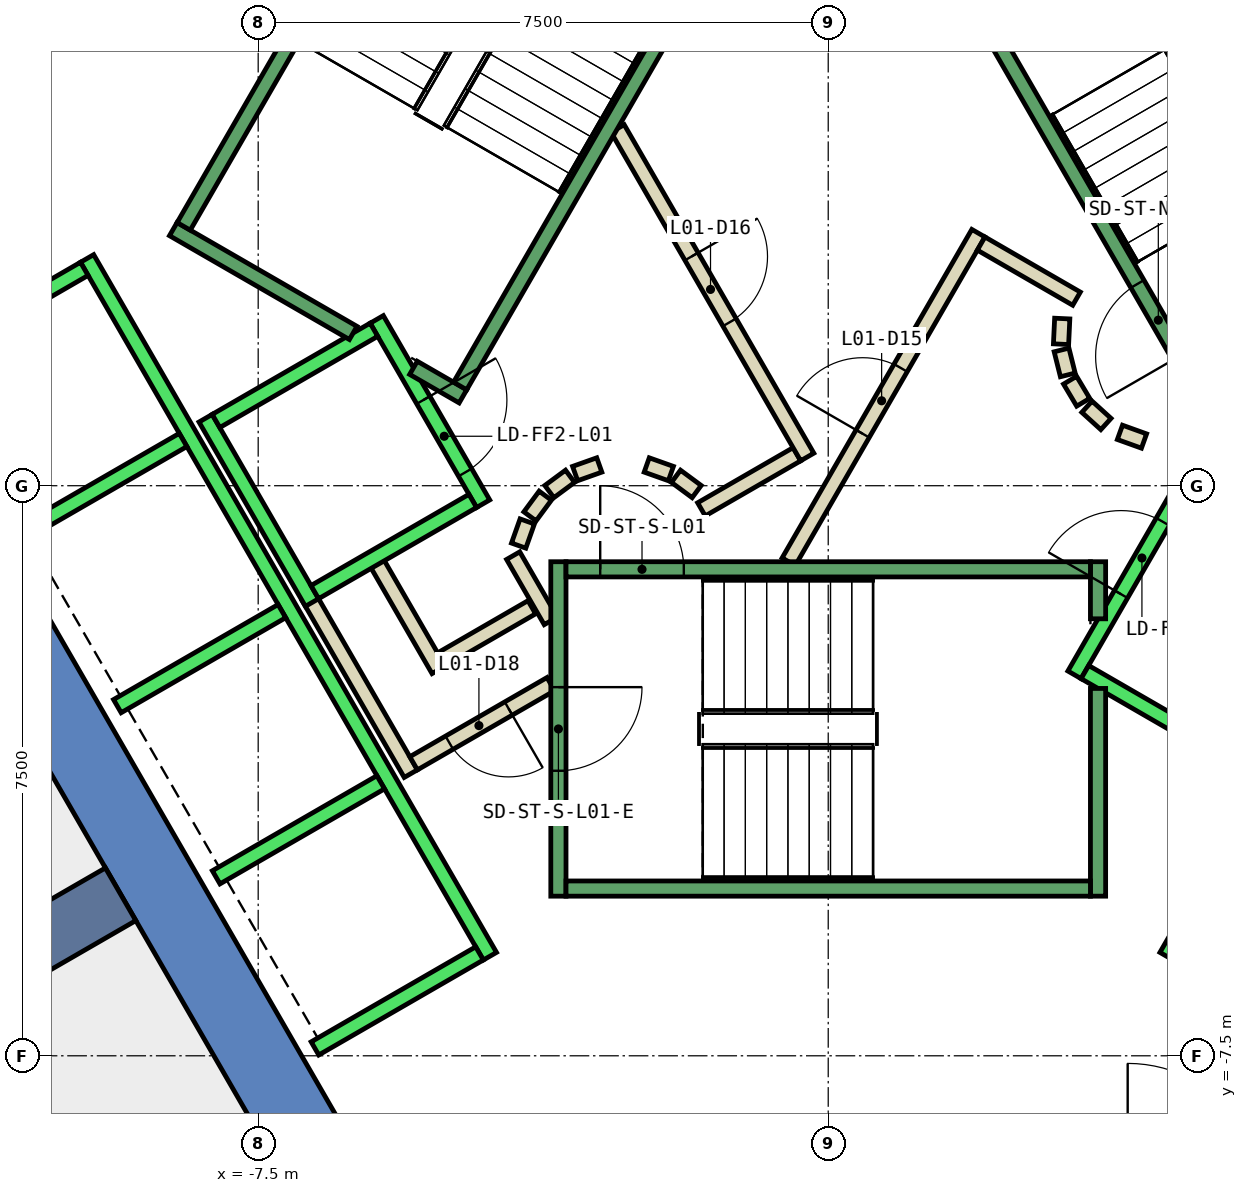
"""IFC4 building model, lengths in metres.
Left out: names, types, materials, properties, quantities, classifications, styles, units other than length and angle.
Written with IfcOpenShell. Run it as: python <this file> out.ifc"""

import sys

from ifc_helpers import new_model, si_unit, direction, frame, frame_2d, origin, place, context, subcontext, project, spatial, polyline, rectangle, outline, extrude, element, fill, save


model = new_model("IFC4")
c1 = context("Model", 3, precision=1e-05, world=origin(), true_north=direction((0.0, 1.0)))
c2 = subcontext(c1, "Body", "Model", "MODEL_VIEW")
j1 = project(units=[si_unit("LENGTHUNIT", "METRE"), si_unit("PLANEANGLEUNIT", "RADIAN")], contexts=[c1])
p1 = place(None, origin())
s1 = spatial("IfcSite", under=j1, at=p1, CompositionType="ELEMENT")
p2 = place(p1, origin())
s2 = spatial("IfcBuilding", under=s1, at=p2, CompositionType="ELEMENT")
p3 = place(p2, frame((0.0, 0.0, 9.0)))
s3 = spatial("IfcBuildingStorey", under=s2, at=p3, CompositionType="ELEMENT", Elevation=9.0)
p4 = place(p3, frame((0.0, 0.0, -0.45)))
e1 = element("IfcWall", 1, at=p4, inside=s3, PredefinedType="SHEAR", context=c2, shape_type="SweptSolid", body=[
    extrude(outline(polyline([(-12.267, 5.252), (-11.402, 4.752), (-6.351, 13.5), (-6.928, 14.5), (-12.267, 5.252)])), origin(), (0.0, 0.0, 1.0), 6.0),
])
p5 = place(p3, frame((0.0, 0.0, -0.45)))
e2 = element("IfcWall", 2, at=p5, inside=s3, PredefinedType="SHEAR", context=c2, shape_type="SweptSolid", body=[
    extrude(outline(polyline([(-13.856, 2.5), (-6.928, -9.5), (-6.351, -8.5), (-12.702, 2.5), (-13.856, 2.5)])), origin(), (0.0, 0.0, 1.0), 6.0),
])
p6 = place(p3, frame((-9.31, -5.375, -0.45), z_axis=(0.0, 0.0, 1.0), x_axis=(-0.866017533419, -0.500013631625, 0.0)))
e3 = element("IfcWall", 3, at=p6, inside=s3, PredefinedType="SHEAR", context=c2, shape_type="SweptSolid", body=[
    extrude(rectangle(XDim=9.0, YDim=0.8, at=frame_2d((4.5, 0.0))), origin(), (0.0, 0.0, 1.0), 6.0),
])
p7 = place(p3, frame((-3.9, -1.599, 0.0), z_axis=(0.0, 0.0, 1.0), x_axis=(-0.865969445389, -0.500096910261, 0.0)))
e4 = element("IfcWall", 4, at=p7, inside=s3, PredefinedType="PARTITIONING", context=c2, shape_type="SweptSolid", body=[
    extrude(rectangle(XDim=1.373, YDim=0.2, at=frame_2d((0.687, 0.0))), origin(), (0.0, 0.0, 1.0), 5.55),
])
p8 = place(p3, frame((-5.126, -2.422, 0.0), z_axis=(0.0, 0.0, 1.0), x_axis=(-0.500062241894, 0.865989465428, 0.0)))
e5 = element("IfcWall", 5, at=p8, inside=s3, PredefinedType="PARTITIONING", context=c2, shape_type="SweptSolid", body=[
    extrude(rectangle(XDim=1.7, YDim=0.2, at=frame_2d((0.85, 0.0))), origin(), (0.0, 0.0, 1.0), 5.55),
])
p9 = place(p3, frame((-5.492, -3.788, 0.0), z_axis=(0.0, 0.0, 1.0), x_axis=(-0.500008949224, 0.866020236886, 0.0)))
e6 = element("IfcWall", 6, at=p9, inside=s3, PredefinedType="PARTITIONING", context=c2, shape_type="SweptSolid", body=[
    extrude(rectangle(XDim=2.68, YDim=0.2, at=frame_2d((1.34, 0.0))), origin(), (0.0, 0.0, 1.0), 5.55),
])
p10 = place(p3, frame((-4.145, -0.92, 0.0), z_axis=(0.0, 0.0, 1.0), x_axis=(0.499743786207, -0.866173278362, 0.0)))
e7 = element("IfcWall", 7, at=p10, inside=s3, PredefinedType="PARTITIONING", context=c2, shape_type="SweptSolid", body=[
    extrude(rectangle(XDim=0.991, YDim=0.2, at=frame_2d((0.495, 0.0))), origin(), (0.0, 0.0, 1.0), 5.55),
])
p11 = place(p3, frame((-3.65, -2.61, 0.0), z_axis=(0.0, 0.0, 1.0), x_axis=(-0.866072462134, -0.499918483688, 0.0)))
e8 = element("IfcWall", 8, at=p11, inside=s3, PredefinedType="PARTITIONING", context=c2, shape_type="SweptSolid", body=[
    extrude(rectangle(XDim=2.084, YDim=0.2, at=frame_2d((1.042, 0.0))), origin(), (0.0, 0.0, 1.0), 5.55),
])
p12 = place(p11, frame((0.642, 0.0, 0.0)))
e9 = element("IfcOpeningElement", 9, at=p12, cuts=e8, PredefinedType="OPENING", context=c2, shape_type="SweptSolid", body=[
    extrude(rectangle(XDim=0.9, YDim=2.1, at=frame_2d((0.45, 1.05))), frame((0.0, 0.11, 0.0), z_axis=(0.0, -1.0, 0.0), x_axis=(1.0, 0.0, 0.0)), (0.0, 0.0, 1.0), 0.22),
])
p13 = place(p3, frame((3.079, 2.199, 0.0), z_axis=(0.0, 0.0, 1.0), x_axis=(-0.047771483479, -0.998858290933, 0.0)))
e10 = element("IfcWall", 10, at=p13, inside=s3, PredefinedType="PARTITIONING", context=c2, shape_type="SweptSolid", body=[
    extrude(rectangle(XDim=0.337, YDim=0.2, at=frame_2d((0.169, 0.0))), origin(), (0.0, 0.0, 1.0), 5.55),
])
p14 = place(p3, frame((3.07, 1.786, 0.0), z_axis=(0.0, 0.0, 1.0), x_axis=(0.242705583207, -0.970099994784, 0.0)))
e11 = element("IfcWall", 11, at=p14, inside=s3, PredefinedType="PARTITIONING", context=c2, shape_type="SweptSolid", body=[
    extrude(rectangle(XDim=0.338, YDim=0.2, at=frame_2d((0.169, 0.0))), origin(), (0.0, 0.0, 1.0), 5.55),
])
for number, where, z_axis, x_axis in (
    (12, (3.182, 1.388, 0.0), (0.0, 0.0, 1.0), (0.512, -0.859, 0.0)),
    (13, (3.404, 1.039, 0.0), (0.0, 0.0, 1.0), (0.74, -0.672, 0.0)),
):
    element("IfcWall", number, at=place(p3, frame(where, z_axis=z_axis, x_axis=x_axis)), inside=s3, PredefinedType="PARTITIONING", context=c2, shape_type="SweptSolid", body=[
        extrude(rectangle(XDim=0.338, YDim=0.2, at=frame_2d((0.169, 0.0))), origin(), (0.0, 0.0, 1.0), 5.55),
    ])
p15 = place(p3, frame((3.838, 0.702, 0.0), z_axis=(0.0, 0.0, 1.0), x_axis=(0.941035081519, -0.338308993895, 0.0)))
e14 = element("IfcWall", 14, at=p15, inside=s3, PredefinedType="PARTITIONING", context=c2, shape_type="SweptSolid", body=[
    extrude(rectangle(XDim=0.337, YDim=0.2, at=frame_2d((0.168, 0.0))), origin(), (0.0, 0.0, 1.0), 5.55),
])
p16 = place(p3, frame((-0.52, -1.0, 0.0), z_axis=(0.0, 0.0, 1.0), x_axis=(0.50011622646, 0.865958290007, 0.0)))
e15 = element("IfcWall", 15, at=p16, inside=s3, PredefinedType="PARTITIONING", context=c2, shape_type="SweptSolid", body=[
    extrude(rectangle(XDim=4.991, YDim=0.2, at=frame_2d((2.496, 0.0))), origin(), (0.0, 0.0, 1.0), 5.55),
])
p17 = place(p16, frame((1.945, 0.0, 0.0)))
e16 = element("IfcOpeningElement", 16, at=p17, cuts=e15, PredefinedType="OPENING", context=c2, shape_type="SweptSolid", body=[
    extrude(rectangle(XDim=1.0, YDim=2.1, at=frame_2d((0.5, 1.05))), frame((0.0, 0.11, 0.0), z_axis=(0.0, -1.0, 0.0), x_axis=(1.0, 0.0, 0.0)), (0.0, 0.0, 1.0), 0.22),
])
p18 = place(p3, frame((2.012, 3.186, 0.0), z_axis=(0.0, 0.0, 1.0), x_axis=(0.865891012941, -0.500232699559, 0.0)))
e17 = element("IfcWall", 17, at=p18, inside=s3, PredefinedType="PARTITIONING", context=c2, shape_type="SweptSolid", body=[
    extrude(rectangle(XDim=1.449, YDim=0.2, at=frame_2d((0.725, 0.0))), origin(), (0.0, 0.0, 1.0), 5.55),
])
p19 = place(p3, frame((-0.412, 0.414, 0.0), z_axis=(0.0, 0.0, 1.0), x_axis=(-0.866017369001, -0.500013916395, 0.0)))
e18 = element("IfcWall", 18, at=p19, inside=s3, PredefinedType="PARTITIONING", context=c2, shape_type="SweptSolid", body=[
    extrude(rectangle(XDim=1.45, YDim=0.2, at=frame_2d((0.725, 0.0))), origin(), (0.0, 0.0, 1.0), 5.55),
])
p20 = place(p3, frame((-1.731, -0.077, 0.0), z_axis=(0.0, 0.0, 1.0), x_axis=(-0.804311165252, 0.594208338422, 0.0)))
e19 = element("IfcWall", 19, at=p20, inside=s3, PredefinedType="PARTITIONING", context=c2, shape_type="SweptSolid", body=[
    extrude(rectangle(XDim=0.338, YDim=0.2, at=frame_2d((0.169, 0.0))), origin(), (0.0, 0.0, 1.0), 5.55),
])
p21 = place(p3, frame((-2.07, 0.16, 0.0), z_axis=(0.0, 0.0, 1.0), x_axis=(-0.942199461132, 0.335052496547, 0.0)))
e20 = element("IfcWall", 20, at=p21, inside=s3, PredefinedType="PARTITIONING", context=c2, shape_type="SweptSolid", body=[
    extrude(rectangle(XDim=0.337, YDim=0.2, at=frame_2d((0.169, 0.0))), origin(), (0.0, 0.0, 1.0), 5.55),
])
p22 = place(p3, frame((-3.012, 0.273, 0.0), z_axis=(0.0, 0.0, 1.0), x_axis=(-0.942280615813, -0.334824194261, 0.0)))
e21 = element("IfcWall", 21, at=p22, inside=s3, PredefinedType="PARTITIONING", context=c2, shape_type="SweptSolid", body=[
    extrude(rectangle(XDim=0.338, YDim=0.2, at=frame_2d((0.169, 0.0))), origin(), (0.0, 0.0, 1.0), 5.55),
])
p23 = place(p3, frame((-3.397, 0.124, 0.0), z_axis=(0.0, 0.0, 1.0), x_axis=(-0.804311165252, -0.594208338422, 0.0)))
e22 = element("IfcWall", 22, at=p23, inside=s3, PredefinedType="PARTITIONING", context=c2, shape_type="SweptSolid", body=[
    extrude(rectangle(XDim=0.338, YDim=0.2, at=frame_2d((0.169, 0.0))), origin(), (0.0, 0.0, 1.0), 5.55),
])
p24 = place(p3, frame((-3.723, -0.131, 0.0), z_axis=(0.0, 0.0, 1.0), x_axis=(-0.594675113454, -0.803966112121, 0.0)))
e23 = element("IfcWall", 23, at=p24, inside=s3, PredefinedType="PARTITIONING", context=c2, shape_type="SweptSolid", body=[
    extrude(rectangle(XDim=0.338, YDim=0.2, at=frame_2d((0.169, 0.0))), origin(), (0.0, 0.0, 1.0), 5.55),
])
p25 = place(p3, frame((-3.96, -0.47, 0.0), z_axis=(0.0, 0.0, 1.0), x_axis=(-0.334824194261, -0.942280615813, 0.0)))
e24 = element("IfcWall", 24, at=p25, inside=s3, PredefinedType="PARTITIONING", context=c2, shape_type="SweptSolid", body=[
    extrude(rectangle(XDim=0.338, YDim=0.2, at=frame_2d((0.169, 0.0))), origin(), (0.0, 0.0, 1.0), 5.55),
])
p26 = place(p3, frame((-2.771, 4.7, 0.0), z_axis=(0.0, 0.0, 1.0), x_axis=(0.499969479948, -0.866043023828, 0.0)))
e25 = element("IfcWall", 25, at=p26, inside=s3, PredefinedType="PARTITIONING", context=c2, shape_type="SweptSolid", body=[
    extrude(rectangle(XDim=4.99, YDim=0.2, at=frame_2d((2.495, 0.0))), origin(), (0.0, 0.0, 1.0), 5.55),
])
p27 = place(p26, frame((1.945, 0.0, 0.0)))
e26 = element("IfcOpeningElement", 26, at=p27, cuts=e25, PredefinedType="OPENING", context=c2, shape_type="SweptSolid", body=[
    extrude(rectangle(XDim=1.0, YDim=2.1, at=frame_2d((0.5, 1.05))), frame((0.0, 0.11, 0.0), z_axis=(0.0, -1.0, 0.0), x_axis=(1.0, 0.0, 0.0)), (0.0, 0.0, 1.0), 0.22),
])
p28 = place(p3, frame((-5.94, 2.188, 0.0), z_axis=(0.0, 0.0, 1.0), x_axis=(0.49994636267, -0.866056369097, 0.0)))
e27 = element("IfcWall", 27, at=p28, inside=s3, PredefinedType="STANDARD", context=c2, shape_type="SweptSolid", body=[
    extrude(rectangle(XDim=2.8, YDim=0.2, at=frame_2d((1.4, 0.0))), origin(), (0.0, 0.0, 1.0), 5.55),
])
p29 = place(p28, frame((1.225, 0.0, 0.0)))
e28 = element("IfcOpeningElement", 28, at=p29, cuts=e27, PredefinedType="OPENING", context=c2, shape_type="SweptSolid", body=[
    extrude(rectangle(XDim=1.1, YDim=2.1, at=frame_2d((0.55, 1.05))), frame((0.0, 0.11, 0.0), z_axis=(0.0, -1.0, 0.0), x_axis=(1.0, 0.0, 0.0)), (0.0, 0.0, 1.0), 0.22),
])
p30 = place(p3, frame((-8.192, 0.888, 0.0), z_axis=(0.0, 0.0, 1.0), x_axis=(0.49994636267, -0.866056369097, 0.0)))
e29 = element("IfcWall", 29, at=p30, inside=s3, PredefinedType="STANDARD", context=c2, shape_type="SweptSolid", body=[
    extrude(rectangle(XDim=2.8, YDim=0.2, at=frame_2d((1.4, 0.0))), origin(), (0.0, 0.0, 1.0), 5.55),
])
for number, where, z_axis, x_axis in (
    (30, (-5.977, 2.052, 0.0), (0.0, 0.0, 1.0), (-0.866, -0.5, 0.0)),
    (31, (-4.677, -0.2, 0.0), (0.0, 0.0, 1.0), (-0.866, -0.5, 0.0)),
):
    element("IfcWall", number, at=place(p3, frame(where, z_axis=z_axis, x_axis=x_axis)), inside=s3, PredefinedType="STANDARD", context=c2, shape_type="SweptSolid", body=[
        extrude(rectangle(XDim=2.399, YDim=0.2, at=frame_2d((1.2, 0.0))), origin(), (0.0, 0.0, 1.0), 5.55),
    ])
p31 = place(p3, frame((-9.751, 2.99, 0.0), z_axis=(0.0, 0.0, 1.0), x_axis=(0.50000090737, -0.866024879913, 0.0)))
e32 = element("IfcWall", 32, at=p31, inside=s3, PredefinedType="STANDARD", context=c2, shape_type="SweptSolid", body=[
    extrude(rectangle(XDim=10.6, YDim=0.2, at=frame_2d((5.3, 0.0))), origin(), (0.0, 0.0, 1.0), 5.55),
])
p32 = place(p3, frame((-9.788, 2.853, 0.0), z_axis=(0.0, 0.0, 1.0), x_axis=(-0.865998541277, -0.500046524342, 0.0)))
e33 = element("IfcWall", 33, at=p32, inside=s3, PredefinedType="STANDARD", context=c2, shape_type="SweptSolid", body=[
    extrude(rectangle(XDim=2.5, YDim=0.2, at=frame_2d((1.25, 0.0))), origin(), (0.0, 0.0, 1.0), 5.55),
])
for number, where, z_axis, x_axis in (
    (34, (-8.488, 0.602, 0.0), (0.0, 0.0, 1.0), (-0.866, -0.5, 0.0)),
    (35, (-7.188, -1.65, 0.0), (0.0, 0.0, 1.0), (-0.866, -0.5, 0.0)),
    (36, (-5.888, -3.902, 0.0), (0.0, 0.0, 1.0), (-0.866, -0.5, 0.0)),
    (37, (-4.588, -6.153, 0.0), (0.0, 0.0, 1.0), (-0.866, -0.5, 0.0)),
):
    element("IfcWall", number, at=place(p3, frame(where, z_axis=z_axis, x_axis=x_axis)), inside=s3, PredefinedType="STANDARD", context=c2, shape_type="SweptSolid", body=[
        extrude(rectangle(XDim=2.5, YDim=0.2, at=frame_2d((1.25, 0.0))), origin(), (0.0, 0.0, 1.0), 5.55),
    ])
p33 = place(p3, frame((3.24, -2.488, 0.0), z_axis=(0.0, 0.0, 1.0), x_axis=(0.49994636267, 0.866056369097, 0.0)))
e38 = element("IfcWall", 38, at=p33, inside=s3, PredefinedType="STANDARD", context=c2, shape_type="SweptSolid", body=[
    extrude(rectangle(XDim=2.8, YDim=0.2, at=frame_2d((1.4, 0.0))), origin(), (0.0, 0.0, 1.0), 5.55),
])
p34 = place(p33, frame((1.225, 0.0, 0.0)))
e39 = element("IfcOpeningElement", 39, at=p34, cuts=e38, PredefinedType="OPENING", context=c2, shape_type="SweptSolid", body=[
    extrude(rectangle(XDim=1.1, YDim=2.1, at=frame_2d((0.55, 1.05))), frame((0.0, 0.11, 0.0), z_axis=(0.0, -1.0, 0.0), x_axis=(1.0, 0.0, 0.0)), (0.0, 0.0, 1.0), 0.22),
])
p35 = place(p3, frame((3.377, -2.452, 0.0), z_axis=(0.0, 0.0, 1.0), x_axis=(0.865955154139, -0.50012165622, 0.0)))
e40 = element("IfcWall", 40, at=p35, inside=s3, PredefinedType="STANDARD", context=c2, shape_type="SweptSolid", body=[
    extrude(rectangle(XDim=2.4, YDim=0.2, at=frame_2d((1.2, 0.0))), origin(), (0.0, 0.0, 1.0), 5.55),
])
p36 = place(p3, frame((4.451, -6.19, 0.0), z_axis=(0.0, 0.0, 1.0), x_axis=(0.50000090737, 0.866024879913, 0.0)))
e41 = element("IfcWall", 41, at=p36, inside=s3, PredefinedType="STANDARD", context=c2, shape_type="SweptSolid", body=[
    extrude(rectangle(XDim=10.6, YDim=0.2, at=frame_2d((5.3, 0.0))), origin(), (0.0, 0.0, 1.0), 5.55),
])
p37 = place(p3, frame((-3.55, -1.0, 0.0), z_axis=(0.0, 0.0, 1.0), x_axis=(0.0, -1.0, 0.0)))
e42 = element("IfcWall", 42, at=p37, inside=s3, PredefinedType="STANDARD", context=c2, shape_type="SweptSolid", body=[
    extrude(rectangle(XDim=4.4, YDim=0.2, at=frame_2d((2.2, 0.0))), origin(), (0.0, 0.0, 1.0), 5.55),
])
p38 = place(p37, frame((1.65, 0.0, 0.0)))
e43 = element("IfcOpeningElement", 43, at=p38, cuts=e42, PredefinedType="OPENING", context=c2, shape_type="SweptSolid", body=[
    extrude(rectangle(XDim=1.1, YDim=2.2, at=frame_2d((0.55, 1.1))), frame((0.0, 0.11, 0.0), z_axis=(0.0, -1.0, 0.0), x_axis=(1.0, 0.0, 0.0)), (0.0, 0.0, 1.0), 0.22),
])
p39 = place(p3, frame((3.55, -2.667, 0.0), z_axis=(0.0, 0.0, 1.0), x_axis=(0.0, -1.0, 0.0)))
e44 = element("IfcWall", 44, at=p39, inside=s3, PredefinedType="STANDARD", context=c2, shape_type="SweptSolid", body=[
    extrude(rectangle(XDim=2.733, YDim=0.2, at=frame_2d((1.366, 0.0))), origin(), (0.0, 0.0, 1.0), 5.55),
])
p40 = place(p3, frame((3.55, -1.0, 0.0), z_axis=(0.0, 0.0, 1.0), x_axis=(0.0, -1.0, 0.0)))
e45 = element("IfcWall", 45, at=p40, inside=s3, PredefinedType="STANDARD", context=c2, shape_type="SweptSolid", body=[
    extrude(rectangle(XDim=0.751, YDim=0.2, at=frame_2d((0.375, 0.0))), origin(), (0.0, 0.0, 1.0), 5.55),
])
p41 = place(p3, frame((-3.45, -1.1, 0.0), z_axis=(0.0, 0.0, 1.0), x_axis=(1.0, 0.0, 0.0)))
e46 = element("IfcWall", 46, at=p41, inside=s3, PredefinedType="STANDARD", context=c2, shape_type="SweptSolid", body=[
    extrude(rectangle(XDim=6.9, YDim=0.2, at=frame_2d((3.45, 0.0))), origin(), (0.0, 0.0, 1.0), 5.55),
])
p42 = place(p41, frame((0.45, 0.0, 0.0)))
e47 = element("IfcOpeningElement", 47, at=p42, cuts=e46, PredefinedType="OPENING", context=c2, shape_type="SweptSolid", body=[
    extrude(rectangle(XDim=1.1, YDim=2.2, at=frame_2d((0.55, 1.1))), frame((0.0, 0.11, 0.0), z_axis=(0.0, -1.0, 0.0), x_axis=(1.0, 0.0, 0.0)), (0.0, 0.0, 1.0), 0.22),
])
p43 = place(p3, frame((-3.45, -5.3, 0.0), z_axis=(0.0, 0.0, 1.0), x_axis=(1.0, 0.0, 0.0)))
e48 = element("IfcWall", 48, at=p43, inside=s3, PredefinedType="STANDARD", context=c2, shape_type="SweptSolid", body=[
    extrude(rectangle(XDim=6.9, YDim=0.2, at=frame_2d((3.45, 0.0))), origin(), (0.0, 0.0, 1.0), 5.55),
])
p44 = place(p3, frame((4.843, 1.312, 0.0), z_axis=(0.0, 0.0, 1.0), x_axis=(-0.499963383562, 0.866046543262, 0.0)))
e49 = element("IfcWall", 49, at=p44, inside=s3, PredefinedType="STANDARD", context=c2, shape_type="SweptSolid", body=[
    extrude(rectangle(XDim=6.9, YDim=0.2, at=frame_2d((3.45, 0.0))), origin(), (0.0, 0.0, 1.0), 5.55),
])
p45 = place(p44, frame((0.45, 0.0, 0.0)))
e50 = element("IfcOpeningElement", 50, at=p45, cuts=e49, PredefinedType="OPENING", context=c2, shape_type="SweptSolid", body=[
    extrude(rectangle(XDim=1.1, YDim=2.2, at=frame_2d((0.55, 1.1))), frame((0.0, 0.11, 0.0), z_axis=(0.0, -1.0, 0.0), x_axis=(1.0, 0.0, 0.0)), (0.0, 0.0, 1.0), 0.22),
])
p46 = place(p3, frame((-6.25, 2.01, 0.0), z_axis=(0.0, 0.0, 1.0), x_axis=(-0.86611865017, 0.499838457731, 0.0)))
e51 = element("IfcWall", 51, at=p46, inside=s3, PredefinedType="STANDARD", context=c2, shape_type="SweptSolid", body=[
    extrude(rectangle(XDim=2.733, YDim=0.2, at=frame_2d((1.366, 0.0))), origin(), (0.0, 0.0, 1.0), 5.55),
])
p47 = place(p3, frame((-4.806, 1.176, 0.0), z_axis=(0.0, 0.0, 1.0), x_axis=(-0.866558586415, 0.499075361355, 0.0)))
e52 = element("IfcWall", 52, at=p47, inside=s3, PredefinedType="STANDARD", context=c2, shape_type="SweptSolid", body=[
    extrude(rectangle(XDim=0.751, YDim=0.2, at=frame_2d((0.376, 0.0))), origin(), (0.0, 0.0, 1.0), 5.55),
])
p48 = place(p3, frame((-1.393, 7.288, 0.0), z_axis=(0.0, 0.0, 1.0), x_axis=(-0.499963383562, -0.866046543262, 0.0)))
e53 = element("IfcWall", 53, at=p48, inside=s3, PredefinedType="STANDARD", context=c2, shape_type="SweptSolid", body=[
    extrude(rectangle(XDim=6.9, YDim=0.2, at=frame_2d((3.45, 0.0))), origin(), (0.0, 0.0, 1.0), 5.55),
])
p49 = place(p48, frame((0.45, 0.0, 0.0)))
e54 = element("IfcOpeningElement", 54, at=p49, cuts=e53, PredefinedType="OPENING", context=c2, shape_type="SweptSolid", body=[
    extrude(rectangle(XDim=1.1, YDim=2.2, at=frame_2d((0.55, 1.1))), frame((0.0, 0.11, 0.0), z_axis=(0.0, -1.0, 0.0), x_axis=(1.0, 0.0, 0.0)), (0.0, 0.0, 1.0), 0.22),
])
p50 = place(p3, frame((-5.03, 9.388, 0.0), z_axis=(0.0, 0.0, 1.0), x_axis=(-0.499978703459, -0.866037698999, 0.0)))
e55 = element("IfcWall", 55, at=p50, inside=s3, PredefinedType="STANDARD", context=c2, shape_type="SweptSolid", body=[
    extrude(rectangle(XDim=6.9, YDim=0.2, at=frame_2d((3.45, 0.0))), origin(), (0.0, 0.0, 1.0), 5.55),
])
p51 = place(p17, origin())
e56 = element("IfcDoor", 56, at=p51, inside=s3, OperationType="SINGLE_SWING_LEFT", PredefinedType="DOOR", context=c2, shape_type="SweptSolid", body=[
    extrude(rectangle(XDim=1.0, YDim=2.1, at=frame_2d((0.5, 1.05))), frame((0.0, 0.025, 0.0), z_axis=(0.0, -1.0, 0.0), x_axis=(1.0, 0.0, 0.0)), (0.0, 0.0, 1.0), 0.05),
])
fill(e16, e56)
p52 = place(p27, origin())
e57 = element("IfcDoor", 57, at=p52, inside=s3, OperationType="SINGLE_SWING_RIGHT", PredefinedType="DOOR", context=c2, shape_type="SweptSolid", body=[
    extrude(rectangle(XDim=1.0, YDim=2.1, at=frame_2d((0.5, 1.05))), frame((0.0, 0.025, 0.0), z_axis=(0.0, -1.0, 0.0), x_axis=(1.0, 0.0, 0.0)), (0.0, 0.0, 1.0), 0.05),
])
fill(e26, e57)
p53 = place(p12, origin())
e58 = element("IfcDoor", 58, at=p53, inside=s3, OperationType="SINGLE_SWING_LEFT", PredefinedType="DOOR", context=c2, shape_type="SweptSolid", body=[
    extrude(rectangle(XDim=0.9, YDim=2.1, at=frame_2d((0.45, 1.05))), frame((0.0, 0.025, 0.0), z_axis=(0.0, -1.0, 0.0), x_axis=(1.0, 0.0, 0.0)), (0.0, 0.0, 1.0), 0.05),
])
fill(e9, e58)
p54 = place(p34, origin())
e59 = element("IfcDoor", 59, at=p54, inside=s3, OperationType="SLIDING_TO_LEFT", PredefinedType="DOOR", context=c2, shape_type="SweptSolid", body=[
    extrude(rectangle(XDim=1.1, YDim=2.1, at=frame_2d((0.55, 1.05))), frame((0.0, 0.025, 0.0), z_axis=(0.0, -1.0, 0.0), x_axis=(1.0, 0.0, 0.0)), (0.0, 0.0, 1.0), 0.05),
])
fill(e39, e59)
p55 = place(p29, origin())
e60 = element("IfcDoor", 60, at=p55, inside=s3, OperationType="SLIDING_TO_LEFT", PredefinedType="DOOR", context=c2, shape_type="SweptSolid", body=[
    extrude(rectangle(XDim=1.1, YDim=2.1, at=frame_2d((0.55, 1.05))), frame((0.0, 0.025, 0.0), z_axis=(0.0, -1.0, 0.0), x_axis=(1.0, 0.0, 0.0)), (0.0, 0.0, 1.0), 0.05),
])
fill(e28, e60)
p56 = place(p42, origin())
e61 = element("IfcDoor", 61, at=p56, inside=s3, OperationType="SINGLE_SWING_LEFT", PredefinedType="DOOR", context=c2, shape_type="SweptSolid", body=[
    extrude(rectangle(XDim=1.1, YDim=2.2, at=frame_2d((0.55, 1.1))), frame((0.0, 0.025, 0.0), z_axis=(0.0, -1.0, 0.0), x_axis=(1.0, 0.0, 0.0)), (0.0, 0.0, 1.0), 0.05),
])
fill(e47, e61)
p57 = place(p38, origin())
e62 = element("IfcDoor", 62, at=p57, inside=s3, OperationType="SINGLE_SWING_LEFT", PredefinedType="DOOR", context=c2, shape_type="SweptSolid", body=[
    extrude(rectangle(XDim=1.1, YDim=2.2, at=frame_2d((0.55, 1.1))), frame((0.0, 0.025, 0.0), z_axis=(0.0, -1.0, 0.0), x_axis=(1.0, 0.0, 0.0)), (0.0, 0.0, 1.0), 0.05),
])
fill(e43, e62)
p58 = place(p45, origin())
e63 = element("IfcDoor", 63, at=p58, inside=s3, OperationType="SINGLE_SWING_LEFT", PredefinedType="DOOR", context=c2, shape_type="SweptSolid", body=[
    extrude(rectangle(XDim=1.1, YDim=2.2, at=frame_2d((0.55, 1.1))), frame((0.0, 0.025, 0.0), z_axis=(0.0, -1.0, 0.0), x_axis=(1.0, 0.0, 0.0)), (0.0, 0.0, 1.0), 0.05),
])
fill(e50, e63)
save(model, sys.argv[1])
